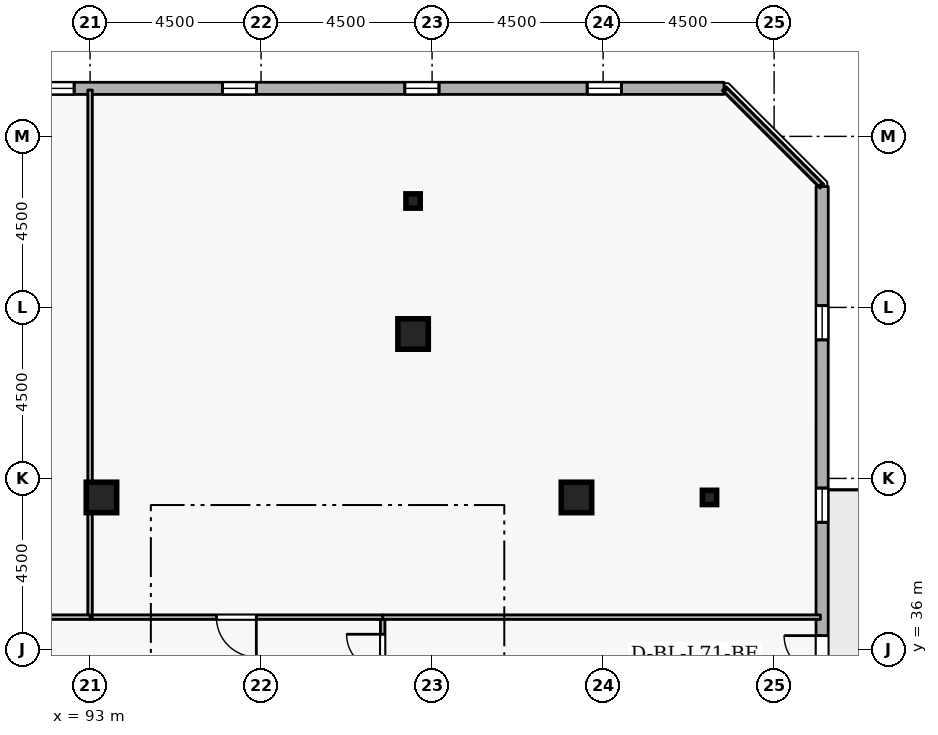
"""IFC4 building model, lengths in metres.
Left out: names, types, materials, properties, quantities, classifications, styles, units other than length and angle.
Written with IfcOpenShell. Run it as: python <this file> out.ifc"""

import sys

from ifc_helpers import new_model, si_unit, direction, frame, frame_2d, origin, origin_2d, place, context, subcontext, project, spatial, rectangle, i_section, extrude, element, fill, save


model = new_model("IFC4")
c1 = context("Model", 3, precision=1e-05, world=origin(), true_north=direction((0.0, 1.0)))
c2 = subcontext(c1, "Body", "Model", "MODEL_VIEW")
j1 = project(units=[si_unit("LENGTHUNIT", "METRE"), si_unit("PLANEANGLEUNIT", "RADIAN")], contexts=[c1])
p1 = place(None, origin())
s1 = spatial("IfcSite", under=j1, at=p1, CompositionType="ELEMENT")
p2 = place(p1, origin())
s2 = spatial("IfcBuilding", under=s1, at=p2, CompositionType="ELEMENT")
p3 = place(p2, frame((0.0, 0.0, 265.5)))
s3 = spatial("IfcBuildingStorey", under=s2, at=p3, CompositionType="ELEMENT", Elevation=265.5)
for number, where, z_axis, x_axis in (
    (1, (105.8, 40.0, 0.0), (0.0, 0.0, 1.0), (1.0, 0.0, 0.0)),
    (2, (101.5, 44.3, 0.0), (0.0, 0.0, 1.0), (1.0, 0.0, 0.0)),
    (3, (93.3, 40.0, 0.0), (0.0, 0.0, 1.0), (1.0, 0.0, 0.0)),
):
    element("IfcColumn", number, at=place(p3, frame(where, z_axis=z_axis, x_axis=x_axis)), inside=s3, PredefinedType="COLUMN", context=c2, shape_type="SweptSolid", body=[
        extrude(rectangle(XDim=0.8, YDim=0.8, at=origin_2d()), origin(), (0.0, 0.0, 1.0), 3.6),
    ])
for number, where, z_axis, x_axis in (
    (4, (109.3, 40.0, 0.0), (0.0, 0.0, 1.0), (1.0, 0.0, 0.0)),
    (5, (101.5, 47.8, 0.0), (0.0, 0.0, 1.0), (1.0, 0.0, 0.0)),
):
    element("IfcColumn", number, at=place(p3, frame(where, z_axis=z_axis, x_axis=x_axis)), inside=s3, PredefinedType="COLUMN", context=c2, shape_type="SweptSolid", body=[
        extrude(i_section(OverallWidth=0.375, OverallDepth=0.375, WebThickness=0.017, FlangeThickness=0.027, FilletRadius=0.015, at=origin_2d()), origin(), (0.0, 0.0, 1.0), 3.6),
    ])
p4 = place(p3, frame((112.262, 12.646, 0.0), z_axis=(0.0, 0.0, 1.0), x_axis=(7.5574884e-05, 0.999999997144, 0.0)))
e6 = element("IfcWall", 6, at=p4, inside=s3, PredefinedType="STANDARD", context=c2, shape_type="SweptSolid", body=[
    extrude(rectangle(XDim=35.535, YDim=0.32, at=frame_2d((17.768, 0.0))), origin(), (0.0, 0.0, 1.0), 2.7),
])
p5 = place(p4, frame((22.718, 0.0, 0.0)))
e7 = element("IfcOpeningElement", 7, at=p5, cuts=e6, PredefinedType="OPENING", context=c2, shape_type="SweptSolid", body=[
    extrude(rectangle(XDim=1.0, YDim=2.08, at=frame_2d((0.5, 1.04))), frame((0.0, 0.17, 0.0), z_axis=(0.0, -1.0, 0.0), x_axis=(1.0, 0.0, 0.0)), (0.0, 0.0, 1.0), 0.34),
])
p6 = place(p4, frame((2.7, 0.0, 0.72)))
e8 = element("IfcOpeningElement", 8, at=p6, cuts=e6, PredefinedType="OPENING", context=c2, shape_type="SweptSolid", body=[
    extrude(rectangle(XDim=0.9, YDim=1.75, at=frame_2d((0.45, 0.875))), frame((0.0, 0.17, 0.0), z_axis=(0.0, -1.0, 0.0), x_axis=(1.0, 0.0, 0.0)), (0.0, 0.0, 1.0), 0.34),
])
p7 = place(p4, frame((7.5, 0.0, 0.72)))
e9 = element("IfcOpeningElement", 9, at=p7, cuts=e6, PredefinedType="OPENING", context=c2, shape_type="SweptSolid", body=[
    extrude(rectangle(XDim=0.9, YDim=1.75, at=frame_2d((0.45, 0.875))), frame((0.0, 0.17, 0.0), z_axis=(0.0, -1.0, 0.0), x_axis=(1.0, 0.0, 0.0)), (0.0, 0.0, 1.0), 0.34),
])
p8 = place(p4, frame((12.3, 0.0, 0.72)))
e10 = element("IfcOpeningElement", 10, at=p8, cuts=e6, PredefinedType="OPENING", context=c2, shape_type="SweptSolid", body=[
    extrude(rectangle(XDim=0.9, YDim=1.75, at=frame_2d((0.45, 0.875))), frame((0.0, 0.17, 0.0), z_axis=(0.0, -1.0, 0.0), x_axis=(1.0, 0.0, 0.0)), (0.0, 0.0, 1.0), 0.34),
])
p9 = place(p4, frame((17.1, 0.0, 0.72)))
e11 = element("IfcOpeningElement", 11, at=p9, cuts=e6, PredefinedType="OPENING", context=c2, shape_type="SweptSolid", body=[
    extrude(rectangle(XDim=0.9, YDim=1.75, at=frame_2d((0.45, 0.875))), frame((0.0, 0.17, 0.0), z_axis=(0.0, -1.0, 0.0), x_axis=(1.0, 0.0, 0.0)), (0.0, 0.0, 1.0), 0.34),
])
p10 = place(p4, frame((26.7, 0.0, 0.72)))
e12 = element("IfcOpeningElement", 12, at=p10, cuts=e6, PredefinedType="OPENING", context=c2, shape_type="SweptSolid", body=[
    extrude(rectangle(XDim=0.9, YDim=1.75, at=frame_2d((0.45, 0.875))), frame((0.0, 0.17, 0.0), z_axis=(0.0, -1.0, 0.0), x_axis=(1.0, 0.0, 0.0)), (0.0, 0.0, 1.0), 0.34),
])
p11 = place(p4, frame((31.5, 0.0, 0.72)))
e13 = element("IfcOpeningElement", 13, at=p11, cuts=e6, PredefinedType="OPENING", context=c2, shape_type="SweptSolid", body=[
    extrude(rectangle(XDim=0.9, YDim=1.75, at=frame_2d((0.45, 0.875))), frame((0.0, 0.17, 0.0), z_axis=(0.0, -1.0, 0.0), x_axis=(1.0, 0.0, 0.0)), (0.0, 0.0, 1.0), 0.34),
])
p12 = place(p3, frame((109.681, 50.765, 0.0), z_axis=(0.0, 0.0, 1.0), x_axis=(-0.999999997144, -7.5574884e-05, 0.0)))
e14 = element("IfcWall", 14, at=p12, inside=s3, PredefinedType="STANDARD", context=c2, shape_type="SweptSolid", body=[
    extrude(rectangle(XDim=35.535, YDim=0.32, at=frame_2d((17.768, 0.0))), origin(), (0.0, 0.0, 1.0), 2.7),
])
p13 = place(p12, frame((2.7, 0.0, 0.72)))
e15 = element("IfcOpeningElement", 15, at=p13, cuts=e14, PredefinedType="OPENING", context=c2, shape_type="SweptSolid", body=[
    extrude(rectangle(XDim=0.9, YDim=1.75, at=frame_2d((0.45, 0.875))), frame((0.0, 0.17, 0.0), z_axis=(0.0, -1.0, 0.0), x_axis=(1.0, 0.0, 0.0)), (0.0, 0.0, 1.0), 0.34),
])
p14 = place(p12, frame((7.5, 0.0, 0.72)))
e16 = element("IfcOpeningElement", 16, at=p14, cuts=e14, PredefinedType="OPENING", context=c2, shape_type="SweptSolid", body=[
    extrude(rectangle(XDim=0.9, YDim=1.75, at=frame_2d((0.45, 0.875))), frame((0.0, 0.17, 0.0), z_axis=(0.0, -1.0, 0.0), x_axis=(1.0, 0.0, 0.0)), (0.0, 0.0, 1.0), 0.34),
])
p15 = place(p12, frame((12.3, 0.0, 0.72)))
e17 = element("IfcOpeningElement", 17, at=p15, cuts=e14, PredefinedType="OPENING", context=c2, shape_type="SweptSolid", body=[
    extrude(rectangle(XDim=0.9, YDim=1.75, at=frame_2d((0.45, 0.875))), frame((0.0, 0.17, 0.0), z_axis=(0.0, -1.0, 0.0), x_axis=(1.0, 0.0, 0.0)), (0.0, 0.0, 1.0), 0.34),
])
p16 = place(p12, frame((17.1, 0.0, 0.72)))
e18 = element("IfcOpeningElement", 18, at=p16, cuts=e14, PredefinedType="OPENING", context=c2, shape_type="SweptSolid", body=[
    extrude(rectangle(XDim=0.9, YDim=1.75, at=frame_2d((0.45, 0.875))), frame((0.0, 0.17, 0.0), z_axis=(0.0, -1.0, 0.0), x_axis=(1.0, 0.0, 0.0)), (0.0, 0.0, 1.0), 0.34),
])
p17 = place(p12, frame((26.7, 0.0, 0.72)))
e19 = element("IfcOpeningElement", 19, at=p17, cuts=e14, PredefinedType="OPENING", context=c2, shape_type="SweptSolid", body=[
    extrude(rectangle(XDim=0.9, YDim=1.75, at=frame_2d((0.45, 0.875))), frame((0.0, 0.17, 0.0), z_axis=(0.0, -1.0, 0.0), x_axis=(1.0, 0.0, 0.0)), (0.0, 0.0, 1.0), 0.34),
])
p18 = place(p12, frame((31.5, 0.0, 0.72)))
e20 = element("IfcOpeningElement", 20, at=p18, cuts=e14, PredefinedType="OPENING", context=c2, shape_type="SweptSolid", body=[
    extrude(rectangle(XDim=0.9, YDim=1.75, at=frame_2d((0.45, 0.875))), frame((0.0, 0.17, 0.0), z_axis=(0.0, -1.0, 0.0), x_axis=(1.0, 0.0, 0.0)), (0.0, 0.0, 1.0), 0.34),
])
p19 = place(p3, frame((100.7, 35.0, 0.0), z_axis=(0.0, 0.0, 1.0), x_axis=(0.0, 1.0, 0.0)))
e21 = element("IfcWall", 21, at=p19, inside=s3, PredefinedType="PARTITIONING", context=c2, shape_type="SweptSolid", body=[
    extrude(rectangle(XDim=1.85, YDim=0.12, at=frame_2d((0.925, 0.0))), origin(), (0.0, 0.0, 1.0), 3.34),
])
p20 = place(p19, frame((0.45, 0.0, 0.0)))
e22 = element("IfcOpeningElement", 22, at=p20, cuts=e21, PredefinedType="OPENING", context=c2, shape_type="SweptSolid", body=[
    extrude(rectangle(XDim=0.95, YDim=2.1, at=frame_2d((0.475, 1.05))), frame((0.0, 0.07, 0.0), z_axis=(0.0, -1.0, 0.0), x_axis=(1.0, 0.0, 0.0)), (0.0, 0.0, 1.0), 0.14),
])
p21 = place(p3, frame((100.7, 36.85, 0.0), z_axis=(0.0, 0.0, 1.0), x_axis=(1.0, 0.0, 0.0)))
e23 = element("IfcWall", 23, at=p21, inside=s3, PredefinedType="PARTITIONING", context=c2, shape_type="SweptSolid", body=[
    extrude(rectangle(XDim=11.52, YDim=0.12, at=frame_2d((5.76, 0.0))), origin(), (0.0, 0.0, 1.0), 3.34),
])
p22 = place(p3, frame((100.7, 36.85, 0.0), z_axis=(0.0, 0.0, 1.0), x_axis=(-1.0, 0.0, 0.0)))
e24 = element("IfcWall", 24, at=p22, inside=s3, PredefinedType="PARTITIONING", context=c2, shape_type="SweptSolid", body=[
    extrude(rectangle(XDim=7.7, YDim=0.12, at=frame_2d((3.85, 0.0))), origin(), (0.0, 0.0, 1.0), 3.34),
])
p23 = place(p22, frame((3.325, 0.0, 0.0)))
e25 = element("IfcOpeningElement", 25, at=p23, cuts=e24, PredefinedType="OPENING", context=c2, shape_type="SweptSolid", body=[
    extrude(rectangle(XDim=1.05, YDim=2.1, at=frame_2d((0.525, 1.05))), frame((0.0, 0.07, 0.0), z_axis=(0.0, -1.0, 0.0), x_axis=(1.0, 0.0, 0.0)), (0.0, 0.0, 1.0), 0.14),
])
p24 = place(p3, frame((93.0, 36.85, 0.0), z_axis=(0.0, 0.0, 1.0), x_axis=(0.0, 1.0, 0.0)))
e26 = element("IfcWall", 26, at=p24, inside=s3, PredefinedType="PARTITIONING", context=c2, shape_type="SweptSolid", body=[
    extrude(rectangle(XDim=13.87, YDim=0.12, at=frame_2d((6.935, 0.0))), origin(), (0.0, 0.0, 1.0), 3.34),
])
p25 = place(p3, frame((109.725, 50.72, 0.0), z_axis=(0.0, 0.0, 1.0), x_axis=(0.707106781187, -0.707106781187, 0.0)))
e27 = element("IfcWall", 27, at=p25, inside=s3, PredefinedType="PARTITIONING", context=c2, shape_type="SweptSolid", body=[
    extrude(rectangle(XDim=3.528, YDim=0.12, at=frame_2d((1.764, 0.0))), origin(), (0.0, 0.0, 1.0), 3.34),
])
p26 = place(p3, frame((93.0, 36.85, 0.0), z_axis=(0.0, 0.0, 1.0), x_axis=(-1.0, 0.0, 0.0)))
e28 = element("IfcWall", 28, at=p26, inside=s3, PredefinedType="PARTITIONING", context=c2, shape_type="SweptSolid", body=[
    extrude(rectangle(XDim=6.3, YDim=0.12, at=frame_2d((3.15, 0.0))), origin(), (0.0, 0.0, 1.0), 3.34),
])
p27 = place(p26, frame((2.625, 0.0, 0.0)))
e29 = element("IfcOpeningElement", 29, at=p27, cuts=e28, PredefinedType="OPENING", context=c2, shape_type="SweptSolid", body=[
    extrude(rectangle(XDim=1.05, YDim=2.1, at=frame_2d((0.525, 1.05))), frame((0.0, 0.07, 0.0), z_axis=(0.0, -1.0, 0.0), x_axis=(1.0, 0.0, 0.0)), (0.0, 0.0, 1.0), 0.14),
])
p28 = place(p5, origin())
e30 = element("IfcDoor", 30, at=p28, inside=s3, OperationType="SINGLE_SWING_RIGHT", PredefinedType="DOOR", context=c2, shape_type="SweptSolid", body=[
    extrude(rectangle(XDim=1.0, YDim=2.08, at=frame_2d((0.5, 1.04))), frame((0.0, 0.025, 0.0), z_axis=(0.0, -1.0, 0.0), x_axis=(1.0, 0.0, 0.0)), (0.0, 0.0, 1.0), 0.05),
])
fill(e7, e30)
p29 = place(p10, origin())
e31 = element("IfcWindow", 31, at=p29, inside=s3, PartitioningType="SINGLE_PANEL", PredefinedType="WINDOW", context=c2, shape_type="SweptSolid", body=[
    extrude(rectangle(XDim=0.9, YDim=1.75, at=frame_2d((0.45, 0.875))), frame((0.0, 0.03, 0.0), z_axis=(0.0, -1.0, 0.0), x_axis=(1.0, 0.0, 0.0)), (0.0, 0.0, 1.0), 0.06),
])
fill(e12, e31)
p30 = place(p11, origin())
e32 = element("IfcWindow", 32, at=p30, inside=s3, PartitioningType="SINGLE_PANEL", PredefinedType="WINDOW", context=c2, shape_type="SweptSolid", body=[
    extrude(rectangle(XDim=0.9, YDim=1.75, at=frame_2d((0.45, 0.875))), frame((0.0, 0.03, 0.0), z_axis=(0.0, -1.0, 0.0), x_axis=(1.0, 0.0, 0.0)), (0.0, 0.0, 1.0), 0.06),
])
fill(e13, e32)
p31 = place(p13, origin())
e33 = element("IfcWindow", 33, at=p31, inside=s3, PartitioningType="SINGLE_PANEL", PredefinedType="WINDOW", context=c2, shape_type="SweptSolid", body=[
    extrude(rectangle(XDim=0.9, YDim=1.75, at=frame_2d((0.45, 0.875))), frame((0.0, 0.03, 0.0), z_axis=(0.0, -1.0, 0.0), x_axis=(1.0, 0.0, 0.0)), (0.0, 0.0, 1.0), 0.06),
])
fill(e15, e33)
p32 = place(p14, origin())
e34 = element("IfcWindow", 34, at=p32, inside=s3, PartitioningType="SINGLE_PANEL", PredefinedType="WINDOW", context=c2, shape_type="SweptSolid", body=[
    extrude(rectangle(XDim=0.9, YDim=1.75, at=frame_2d((0.45, 0.875))), frame((0.0, 0.03, 0.0), z_axis=(0.0, -1.0, 0.0), x_axis=(1.0, 0.0, 0.0)), (0.0, 0.0, 1.0), 0.06),
])
fill(e16, e34)
p33 = place(p15, origin())
e35 = element("IfcWindow", 35, at=p33, inside=s3, PartitioningType="SINGLE_PANEL", PredefinedType="WINDOW", context=c2, shape_type="SweptSolid", body=[
    extrude(rectangle(XDim=0.9, YDim=1.75, at=frame_2d((0.45, 0.875))), frame((0.0, 0.03, 0.0), z_axis=(0.0, -1.0, 0.0), x_axis=(1.0, 0.0, 0.0)), (0.0, 0.0, 1.0), 0.06),
])
fill(e17, e35)
p34 = place(p16, origin())
e36 = element("IfcWindow", 36, at=p34, inside=s3, PartitioningType="SINGLE_PANEL", PredefinedType="WINDOW", context=c2, shape_type="SweptSolid", body=[
    extrude(rectangle(XDim=0.9, YDim=1.75, at=frame_2d((0.45, 0.875))), frame((0.0, 0.03, 0.0), z_axis=(0.0, -1.0, 0.0), x_axis=(1.0, 0.0, 0.0)), (0.0, 0.0, 1.0), 0.06),
])
fill(e18, e36)
p35 = place(p20, origin())
e37 = element("IfcDoor", 37, at=p35, inside=s3, OperationType="SINGLE_SWING_RIGHT", PredefinedType="DOOR", context=c2, shape_type="SweptSolid", body=[
    extrude(rectangle(XDim=0.95, YDim=2.1, at=frame_2d((0.475, 1.05))), frame((0.0, 0.025, 0.0), z_axis=(0.0, -1.0, 0.0), x_axis=(1.0, 0.0, 0.0)), (0.0, 0.0, 1.0), 0.05),
])
fill(e22, e37)
p36 = place(p23, origin())
e38 = element("IfcDoor", 38, at=p36, inside=s3, OperationType="SINGLE_SWING_LEFT", PredefinedType="DOOR", context=c2, shape_type="SweptSolid", body=[
    extrude(rectangle(XDim=1.05, YDim=2.1, at=frame_2d((0.525, 1.05))), frame((0.0, 0.025, 0.0), z_axis=(0.0, -1.0, 0.0), x_axis=(1.0, 0.0, 0.0)), (0.0, 0.0, 1.0), 0.05),
])
fill(e25, e38)
save(model, sys.argv[1])
